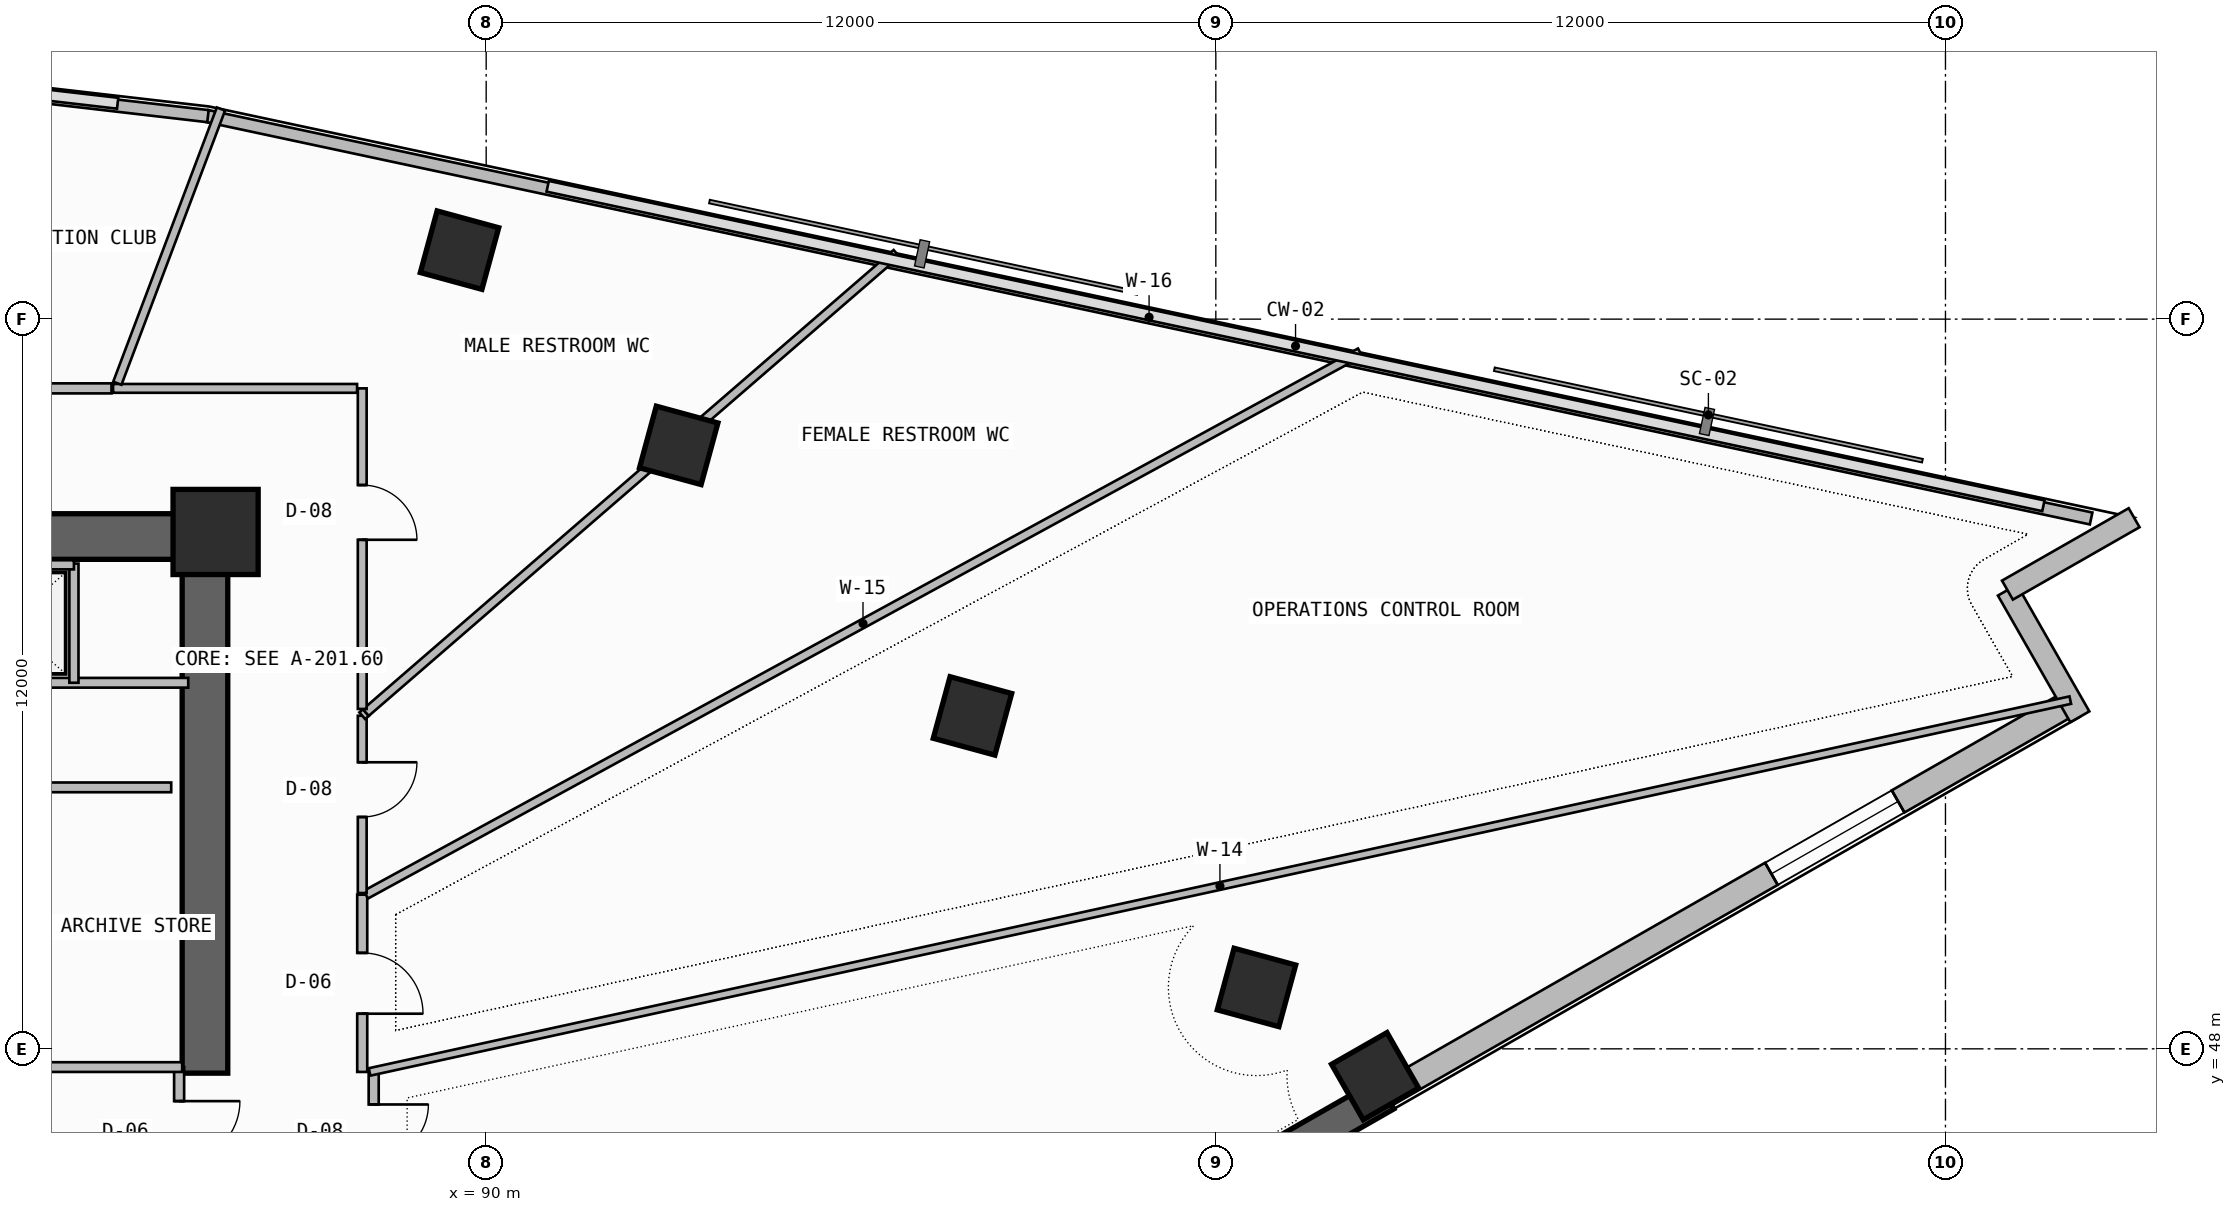
"""IFC4 building model, lengths in metres.
Left out: names, types, materials, properties, quantities, classifications, styles, units other than length and angle.
Written with IfcOpenShell. Run it as: python <this file> out.ifc"""

import sys

from ifc_helpers import new_model, si_unit, direction, frame, frame_2d, origin, origin_2d, place, context, subcontext, project, spatial, rectangle, extrude, element, fill, save


model = new_model("IFC4")
c1 = context("Model", 3, precision=1e-05, world=origin(), true_north=direction((0.0, 1.0)))
c2 = subcontext(c1, "Body", "Model", "MODEL_VIEW")
j1 = project(units=[si_unit("LENGTHUNIT", "METRE"), si_unit("PLANEANGLEUNIT", "RADIAN")], contexts=[c1])
p1 = place(None, origin())
s1 = spatial("IfcSite", under=j1, at=p1, CompositionType="ELEMENT")
p2 = place(p1, origin())
s2 = spatial("IfcBuilding", under=s1, at=p2, CompositionType="ELEMENT")
p3 = place(p2, frame((0.0, 0.0, 214.98)))
s3 = spatial("IfcBuildingStorey", under=s2, at=p3, CompositionType="ELEMENT", Elevation=214.98)
p4 = place(p3, frame((72.0, 56.425, -0.26), z_axis=(0.0, 0.0, 1.0), x_axis=(1.0, 0.0, 0.0)))
e1 = element("IfcWall", 1, at=p4, inside=s3, PredefinedType="SHEAR", context=c2, shape_type="SweptSolid", body=[
    extrude(rectangle(XDim=13.75, YDim=0.75, at=frame_2d((6.875, 0.0))), origin(), (0.0, 0.0, 1.0), 3.52),
])
p5 = place(p3, frame((85.375, 47.6, -0.26), z_axis=(0.0, 0.0, 1.0), x_axis=(0.0, 1.0, 0.0)))
e2 = element("IfcWall", 2, at=p5, inside=s3, PredefinedType="SHEAR", context=c2, shape_type="SweptSolid", body=[
    extrude(rectangle(XDim=8.45, YDim=0.75, at=frame_2d((4.225, 0.0))), origin(), (0.0, 0.0, 1.0), 3.52),
])
p6 = place(p3, frame((85.55, 56.5, 0.0), z_axis=(0.0, 0.0, 1.0), x_axis=(1.0, 0.0, 0.0)))
e3 = element("IfcColumn", 3, at=p6, inside=s3, PredefinedType="COLUMN", context=c2, shape_type="SweptSolid", body=[
    extrude(rectangle(XDim=1.4, YDim=1.4, at=origin_2d()), origin(), (0.0, 0.0, 1.0), 3.52),
])
for number, where, z_axis, x_axis in (
    (4, (104.62, 47.55, 0.0), (0.0, 0.0, 1.0), (0.868, 0.496, 0.0)),
    (5, (102.669, 49.01, 0.0), (0.0, 0.0, 1.0), (0.263, 0.965, 0.0)),
    (6, (97.998, 53.475, 0.0), (0.0, 0.0, 1.0), (0.263, 0.965, 0.0)),
    (7, (93.167, 57.924, 0.0), (0.0, 0.0, 1.0), (0.263, 0.965, 0.0)),
    (8, (89.562, 61.135, 0.0), (0.0, 0.0, 1.0), (0.263, 0.965, 0.0)),
):
    element("IfcColumn", number, at=place(p3, frame(where, z_axis=z_axis, x_axis=x_axis)), inside=s3, PredefinedType="COLUMN", context=c2, shape_type="SweptSolid", body=[
        extrude(rectangle(XDim=1.05, YDim=1.05, at=origin_2d()), origin(), (0.0, 0.0, 1.0), 3.52),
    ])
p7 = place(p3, frame((89.479, 38.499, -0.26), z_axis=(0.0, 0.0, 1.0), x_axis=(0.868197136736, 0.496219439123, 0.0)))
e9 = element("IfcWall", 9, at=p7, inside=s3, PredefinedType="SHEAR", context=c2, shape_type="SweptSolid", body=[
    extrude(rectangle(XDim=17.636, YDim=0.55, at=frame_2d((8.818, 0.0))), origin(), (0.0, 0.0, 1.0), 3.52),
])
p8 = place(p7, frame((11.464, 0.0, 1.1)))
e10 = element("IfcOpeningElement", 10, at=p8, cuts=e9, PredefinedType="OPENING", context=c2, shape_type="SweptSolid", body=[
    extrude(rectangle(XDim=2.4, YDim=1.2, at=frame_2d((1.2, 0.6))), frame((0.0, 0.285, 0.0), z_axis=(0.0, -1.0, 0.0), x_axis=(1.0, 0.0, 0.0)), (0.0, 0.0, 1.0), 0.57),
])
p9 = place(p3, frame((104.791, 47.25, 0.0), z_axis=(0.0, 0.0, 1.0), x_axis=(0.868193423982, 0.496225934987, 0.0)))
e11 = element("IfcWall", 11, at=p9, inside=s3, PredefinedType="SOLIDWALL", context=c2, shape_type="SweptSolid", body=[
    extrude(rectangle(XDim=12.995, YDim=0.42, at=frame_2d((6.498, 0.0))), origin(), (0.0, 0.0, 1.0), 2.245),
])
p10 = place(p9, frame((7.31, 0.0, 0.965)))
e12 = element("IfcOpeningElement", 12, at=p10, cuts=e11, PredefinedType="OPENING", context=c2, shape_type="SweptSolid", body=[
    extrude(rectangle(XDim=2.4, YDim=1.2, at=frame_2d((1.2, 0.6))), frame((0.0, 0.22, 0.0), z_axis=(0.0, -1.0, 0.0), x_axis=(1.0, 0.0, 0.0)), (0.0, 0.0, 1.0), 0.44),
])
p11 = place(p3, frame((116.21, 53.46, 0.0), z_axis=(0.0, 0.0, 1.0), x_axis=(-0.496215637313, 0.868199309655, 0.0)))
e13 = element("IfcWall", 13, at=p11, inside=s3, PredefinedType="SOLIDWALL", context=c2, shape_type="SweptSolid", body=[
    extrude(rectangle(XDim=2.399, YDim=0.36, at=frame_2d((1.2, 0.0))), origin(), (0.0, 0.0, 1.0), 3.26),
])
p12 = place(p3, frame((115.019, 55.543, 0.0), z_axis=(0.0, 0.0, 1.0), x_axis=(0.86818053093, 0.4962484919, 0.0)))
e14 = element("IfcWall", 14, at=p12, inside=s3, PredefinedType="SOLIDWALL", context=c2, shape_type="SweptSolid", body=[
    extrude(rectangle(XDim=2.4, YDim=0.36, at=frame_2d((1.2, 0.0))), origin(), (0.0, 0.0, 1.0), 3.26),
])
p13 = place(p3, frame((116.396, 56.722, 0.0), z_axis=(0.0, 0.0, 1.0), x_axis=(-0.977936620644, 0.208901809478, 0.0)))
e15 = element("IfcWall", 15, at=p13, inside=s3, PredefinedType="PARAPET", context=c2, shape_type="SweptSolid", body=[
    extrude(rectangle(XDim=31.685, YDim=0.2, at=frame_2d((15.843, 0.0))), origin(), (0.0, 0.0, 1.0), 1.15),
])
p14 = place(p3, frame((85.424, 63.338, 0.0), z_axis=(0.0, 0.0, 1.0), x_axis=(-0.993364714048, 0.115006716693, 0.0)))
e16 = element("IfcWall", 16, at=p14, inside=s3, PredefinedType="PARAPET", context=c2, shape_type="SweptSolid", body=[
    extrude(rectangle(XDim=26.302, YDim=0.2, at=frame_2d((13.151, 0.0))), origin(), (0.0, 0.0, 1.0), 1.15),
])
p15 = place(p3, frame((84.95, 45.58, 0.0), z_axis=(0.0, 0.0, 1.0), x_axis=(0.0, 1.0, 0.0)))
e17 = element("IfcWall", 17, at=p15, inside=s3, PredefinedType="PARTITIONING", context=c2, shape_type="SweptSolid", body=[
    extrude(rectangle(XDim=2.12, YDim=0.165, at=frame_2d((1.06, 0.0))), origin(), (0.0, 0.0, 1.0), 3.26),
])
p16 = place(p15, frame((0.56, 0.0, 0.0)))
e18 = element("IfcOpeningElement", 18, at=p16, cuts=e17, PredefinedType="OPENING", context=c2, shape_type="SweptSolid", body=[
    extrude(rectangle(XDim=1.0, YDim=2.2, at=frame_2d((0.5, 1.1))), frame((0.0, 0.093, 0.0), z_axis=(0.0, -1.0, 0.0), x_axis=(1.0, 0.0, 0.0)), (0.0, 0.0, 1.0), 0.185),
])
p17 = place(p3, frame((80.6, 47.7, 0.0), z_axis=(0.0, 0.0, 1.0), x_axis=(1.0, 0.0, 0.0)))
e19 = element("IfcWall", 19, at=p17, inside=s3, PredefinedType="SOLIDWALL", context=c2, shape_type="SweptSolid", body=[
    extrude(rectangle(XDim=4.4, YDim=0.16, at=frame_2d((2.2, 0.0))), origin(), (0.0, 0.0, 1.0), 3.26),
])
p18 = place(p3, frame((80.6, 52.3, 0.0), z_axis=(0.0, 0.0, 1.0), x_axis=(1.0, 0.0, 0.0)))
e20 = element("IfcWall", 20, at=p18, inside=s3, PredefinedType="SOLIDWALL", context=c2, shape_type="SweptSolid", body=[
    extrude(rectangle(XDim=4.22, YDim=0.16, at=frame_2d((2.11, 0.0))), origin(), (0.0, 0.0, 1.0), 3.26),
])
p19 = place(p3, frame((73.02, 54.02, 0.0), z_axis=(0.0, 0.0, 1.0), x_axis=(1.0, 0.0, 0.0)))
e21 = element("IfcWall", 21, at=p19, inside=s3, PredefinedType="SOLIDWALL", context=c2, shape_type="SweptSolid", body=[
    extrude(rectangle(XDim=12.08, YDim=0.16, at=frame_2d((6.04, 0.0))), origin(), (0.0, 0.0, 1.0), 3.26),
])
p20 = place(p19, frame((4.03, 0.0, 0.0)))
e22 = element("IfcOpeningElement", 22, at=p20, cuts=e21, PredefinedType="OPENING", context=c2, shape_type="SweptSolid", body=[
    extrude(rectangle(XDim=1.1, YDim=2.25, at=frame_2d((0.55, 1.125))), frame((0.0, 0.09, 0.0), z_axis=(0.0, -1.0, 0.0), x_axis=(1.0, 0.0, 0.0)), (0.0, 0.0, 1.0), 0.18),
])
p21 = place(p19, frame((6.28, 0.0, 0.0)))
e23 = element("IfcOpeningElement", 23, at=p21, cuts=e21, PredefinedType="OPENING", context=c2, shape_type="SweptSolid", body=[
    extrude(rectangle(XDim=1.1, YDim=2.25, at=frame_2d((0.55, 1.125))), frame((0.0, 0.09, 0.0), z_axis=(0.0, -1.0, 0.0), x_axis=(1.0, 0.0, 0.0)), (0.0, 0.0, 1.0), 0.18),
])
p22 = place(p19, frame((8.53, 0.0, 0.0)))
e24 = element("IfcOpeningElement", 24, at=p22, cuts=e21, PredefinedType="OPENING", context=c2, shape_type="SweptSolid", body=[
    extrude(rectangle(XDim=1.1, YDim=2.25, at=frame_2d((0.55, 1.125))), frame((0.0, 0.09, 0.0), z_axis=(0.0, -1.0, 0.0), x_axis=(1.0, 0.0, 0.0)), (0.0, 0.0, 1.0), 0.18),
])
p23 = place(p3, frame((83.22, 54.02, 0.0), z_axis=(0.0, 0.0, 1.0), x_axis=(0.0, 1.0, 0.0)))
e25 = element("IfcWall", 25, at=p23, inside=s3, PredefinedType="SOLIDWALL", context=c2, shape_type="SweptSolid", body=[
    extrude(rectangle(XDim=1.96, YDim=0.15, at=frame_2d((0.98, 0.0))), origin(), (0.0, 0.0, 1.0), 3.26),
])
p24 = place(p3, frame((76.52, 55.96, 0.0), z_axis=(0.0, 0.0, 1.0), x_axis=(1.0, 0.0, 0.0)))
e26 = element("IfcWall", 26, at=p24, inside=s3, PredefinedType="SOLIDWALL", context=c2, shape_type="SweptSolid", body=[
    extrude(rectangle(XDim=6.7, YDim=0.15, at=frame_2d((3.35, 0.0))), origin(), (0.0, 0.0, 1.0), 3.26),
])
p25 = place(p3, frame((88.15, 45.65, 0.0), z_axis=(0.0, 0.0, 1.0), x_axis=(0.0, 1.0, 0.0)))
e27 = element("IfcWall", 27, at=p25, inside=s3, PredefinedType="PARTITIONING", context=c2, shape_type="SweptSolid", body=[
    extrude(rectangle(XDim=1.97, YDim=0.165, at=frame_2d((0.985, 0.0))), origin(), (0.0, 0.0, 1.0), 3.26),
])
p26 = place(p25, frame((0.535, 0.0, 0.0)))
e28 = element("IfcOpeningElement", 28, at=p26, cuts=e27, PredefinedType="OPENING", context=c2, shape_type="SweptSolid", body=[
    extrude(rectangle(XDim=0.9, YDim=2.1, at=frame_2d((0.45, 1.05))), frame((0.0, 0.093, 0.0), z_axis=(0.0, -1.0, 0.0), x_axis=(1.0, 0.0, 0.0)), (0.0, 0.0, 1.0), 0.185),
])
p27 = place(p3, frame((88.082, 47.62, 0.0), z_axis=(0.0, 0.0, 1.0), x_axis=(0.976930213731, 0.21355879167, 0.0)))
e29 = element("IfcWall", 29, at=p27, inside=s3, PredefinedType="PARTITIONING", context=c2, shape_type="SweptSolid", body=[
    extrude(rectangle(XDim=28.631, YDim=0.125, at=frame_2d((14.316, 0.0))), origin(), (0.0, 0.0, 1.0), 2.645),
])
p28 = place(p3, frame((87.961, 47.62, 0.0), z_axis=(0.0, 0.0, 1.0), x_axis=(0.0, 1.0, 0.0)))
e30 = element("IfcWall", 30, at=p28, inside=s3, PredefinedType="PARTITIONING", context=c2, shape_type="SweptSolid", body=[
    extrude(rectangle(XDim=2.915, YDim=0.165, at=frame_2d((1.458, 0.0))), origin(), (0.0, 0.0, 1.0), 3.26),
])
p29 = place(p28, frame((0.958, 0.0, 0.0)))
e31 = element("IfcOpeningElement", 31, at=p29, cuts=e30, PredefinedType="OPENING", context=c2, shape_type="SweptSolid", body=[
    extrude(rectangle(XDim=1.0, YDim=2.2, at=frame_2d((0.5, 1.1))), frame((0.0, 0.093, 0.0), z_axis=(0.0, -1.0, 0.0), x_axis=(1.0, 0.0, 0.0)), (0.0, 0.0, 1.0), 0.185),
])
p30 = place(p3, frame((88.021, 50.535, 0.0), z_axis=(0.0, 0.0, 1.0), x_axis=(0.877922622052, 0.478802537264, 0.0)))
e32 = element("IfcWall", 32, at=p30, inside=s3, PredefinedType="PARTITIONING", context=c2, shape_type="SweptSolid", body=[
    extrude(rectangle(XDim=18.625, YDim=0.145, at=frame_2d((9.313, 0.0))), origin(), (0.0, 0.0, 1.0), 2.645),
])
p31 = place(p3, frame((87.961, 50.563, 0.0), z_axis=(0.0, 0.0, 1.0), x_axis=(0.0, 1.0, 0.0)))
e33 = element("IfcWall", 33, at=p31, inside=s3, PredefinedType="PARTITIONING", context=c2, shape_type="SweptSolid", body=[
    extrude(rectangle(XDim=2.915, YDim=0.145, at=frame_2d((1.458, 0.0))), origin(), (0.0, 0.0, 1.0), 3.26),
])
p32 = place(p31, frame((1.25, 0.0, 0.0)))
e34 = element("IfcOpeningElement", 34, at=p32, cuts=e33, PredefinedType="OPENING", context=c2, shape_type="SweptSolid", body=[
    extrude(rectangle(XDim=0.9, YDim=2.1, at=frame_2d((0.45, 1.05))), frame((0.0, 0.083, 0.0), z_axis=(0.0, -1.0, 0.0), x_axis=(1.0, 0.0, 0.0)), (0.0, 0.0, 1.0), 0.165),
])
p33 = place(p3, frame((87.961, 53.478, 0.0), z_axis=(0.0, 0.0, 1.0), x_axis=(0.757514976672, 0.652817784774, 0.0)))
e35 = element("IfcWall", 35, at=p33, inside=s3, PredefinedType="PARTITIONING", context=c2, shape_type="SweptSolid", body=[
    extrude(rectangle(XDim=0.079, YDim=0.145, at=frame_2d((0.04, 0.0))), origin(), (0.0, 0.0, 1.0), 3.26),
])
p34 = place(p3, frame((88.021, 53.53, 0.0), z_axis=(0.0, 0.0, 1.0), x_axis=(0.756178143134, 0.654365811948, 0.0)))
e36 = element("IfcWall", 36, at=p34, inside=s3, PredefinedType="PARTITIONING", context=c2, shape_type="SweptSolid", body=[
    extrude(rectangle(XDim=11.541, YDim=0.145, at=frame_2d((5.771, 0.0))), origin(), (0.0, 0.0, 1.0), 2.645),
])
p35 = place(p3, frame((87.961, 53.59, 0.0), z_axis=(0.0, 0.0, 1.0), x_axis=(0.0, 1.0, 0.0)))
e37 = element("IfcWall", 37, at=p35, inside=s3, PredefinedType="PARTITIONING", context=c2, shape_type="SweptSolid", body=[
    extrude(rectangle(XDim=5.272, YDim=0.145, at=frame_2d((2.636, 0.0))), origin(), (0.0, 0.0, 1.0), 2.745),
])
p36 = place(p35, frame((2.782, 0.0, 0.0)))
e38 = element("IfcOpeningElement", 38, at=p36, cuts=e37, PredefinedType="OPENING", context=c2, shape_type="SweptSolid", body=[
    extrude(rectangle(XDim=0.9, YDim=2.1, at=frame_2d((0.45, 1.05))), frame((0.0, 0.083, 0.0), z_axis=(0.0, -1.0, 0.0), x_axis=(1.0, 0.0, 0.0)), (0.0, 0.0, 1.0), 0.165),
])
p37 = place(p3, frame((87.877, 58.861, 0.0), z_axis=(0.0, 0.0, 1.0), x_axis=(-1.0, 0.0, 0.0)))
e39 = element("IfcWall", 39, at=p37, inside=s3, PredefinedType="PARTITIONING", context=c2, shape_type="SweptSolid", body=[
    extrude(rectangle(XDim=4.013, YDim=0.145, at=frame_2d((2.007, 0.0))), origin(), (0.0, 0.0, 1.0), 2.745),
])
p38 = place(p3, frame((83.934, 58.946, 0.0), z_axis=(0.0, 0.0, 1.0), x_axis=(0.353431098222, 0.93546055973, 0.0)))
e40 = element("IfcWall", 40, at=p38, inside=s3, PredefinedType="PARTITIONING", context=c2, shape_type="SweptSolid", body=[
    extrude(rectangle(XDim=4.821, YDim=0.145, at=frame_2d((2.41, 0.0))), origin(), (0.0, 0.0, 1.0), 3.26),
])
p39 = place(p3, frame((83.838, 58.861, 0.0), z_axis=(0.0, 0.0, 1.0), x_axis=(-1.0, 0.0, 0.0)))
e41 = element("IfcWall", 41, at=p39, inside=s3, PredefinedType="PARTITIONING", context=c2, shape_type="SweptSolid", body=[
    extrude(rectangle(XDim=4.094, YDim=0.165, at=frame_2d((2.047, 0.0))), origin(), (0.0, 0.0, 1.0), 3.26),
])
p40 = place(p10, origin())
e42 = element("IfcWindow", 42, at=p40, inside=s3, PartitioningType="SINGLE_PANEL", PredefinedType="WINDOW", context=c2, shape_type="SweptSolid", body=[
    extrude(rectangle(XDim=2.4, YDim=1.2, at=frame_2d((1.2, 0.6))), frame((0.0, 0.03, 0.0), z_axis=(0.0, -1.0, 0.0), x_axis=(1.0, 0.0, 0.0)), (0.0, 0.0, 1.0), 0.06),
])
fill(e12, e42)
p41 = place(p16, frame((1.0, 0.0, 0.0), z_axis=(0.0, 0.0, 1.0), x_axis=(-1.0, 0.0, 0.0)))
e43 = element("IfcDoor", 43, at=p41, inside=s3, OperationType="SINGLE_SWING_LEFT", PredefinedType="DOOR", context=c2, shape_type="SweptSolid", body=[
    extrude(rectangle(XDim=1.0, YDim=2.2, at=frame_2d((0.5, 1.1))), frame((0.0, 0.025, 0.0), z_axis=(0.0, -1.0, 0.0), x_axis=(1.0, 0.0, 0.0)), (0.0, 0.0, 1.0), 0.05),
])
fill(e18, e43)
p42 = place(p26, frame((0.9, 0.0, 0.0), z_axis=(0.0, 0.0, 1.0), x_axis=(-1.0, 0.0, 0.0)))
e44 = element("IfcDoor", 44, at=p42, inside=s3, OperationType="SINGLE_SWING_LEFT", PredefinedType="DOOR", context=c2, shape_type="SweptSolid", body=[
    extrude(rectangle(XDim=0.9, YDim=2.1, at=frame_2d((0.45, 1.05))), frame((0.0, 0.025, 0.0), z_axis=(0.0, -1.0, 0.0), x_axis=(1.0, 0.0, 0.0)), (0.0, 0.0, 1.0), 0.05),
])
fill(e28, e44)
p43 = place(p29, frame((1.0, 0.0, 0.0), z_axis=(0.0, 0.0, 1.0), x_axis=(-1.0, 0.0, 0.0)))
e45 = element("IfcDoor", 45, at=p43, inside=s3, OperationType="SINGLE_SWING_RIGHT", PredefinedType="DOOR", context=c2, shape_type="SweptSolid", body=[
    extrude(rectangle(XDim=1.0, YDim=2.2, at=frame_2d((0.5, 1.1))), frame((0.0, 0.025, 0.0), z_axis=(0.0, -1.0, 0.0), x_axis=(1.0, 0.0, 0.0)), (0.0, 0.0, 1.0), 0.05),
])
fill(e31, e45)
p44 = place(p32, frame((0.9, 0.0, 0.0), z_axis=(0.0, 0.0, 1.0), x_axis=(-1.0, 0.0, 0.0)))
e46 = element("IfcDoor", 46, at=p44, inside=s3, OperationType="SINGLE_SWING_LEFT", PredefinedType="DOOR", context=c2, shape_type="SweptSolid", body=[
    extrude(rectangle(XDim=0.9, YDim=2.1, at=frame_2d((0.45, 1.05))), frame((0.0, 0.025, 0.0), z_axis=(0.0, -1.0, 0.0), x_axis=(1.0, 0.0, 0.0)), (0.0, 0.0, 1.0), 0.05),
])
fill(e34, e46)
p45 = place(p36, frame((0.9, 0.0, 0.0), z_axis=(0.0, 0.0, 1.0), x_axis=(-1.0, 0.0, 0.0)))
e47 = element("IfcDoor", 47, at=p45, inside=s3, OperationType="SINGLE_SWING_RIGHT", PredefinedType="DOOR", context=c2, shape_type="SweptSolid", body=[
    extrude(rectangle(XDim=0.9, YDim=2.1, at=frame_2d((0.45, 1.05))), frame((0.0, 0.025, 0.0), z_axis=(0.0, -1.0, 0.0), x_axis=(1.0, 0.0, 0.0)), (0.0, 0.0, 1.0), 0.05),
])
fill(e38, e47)
save(model, sys.argv[1])
